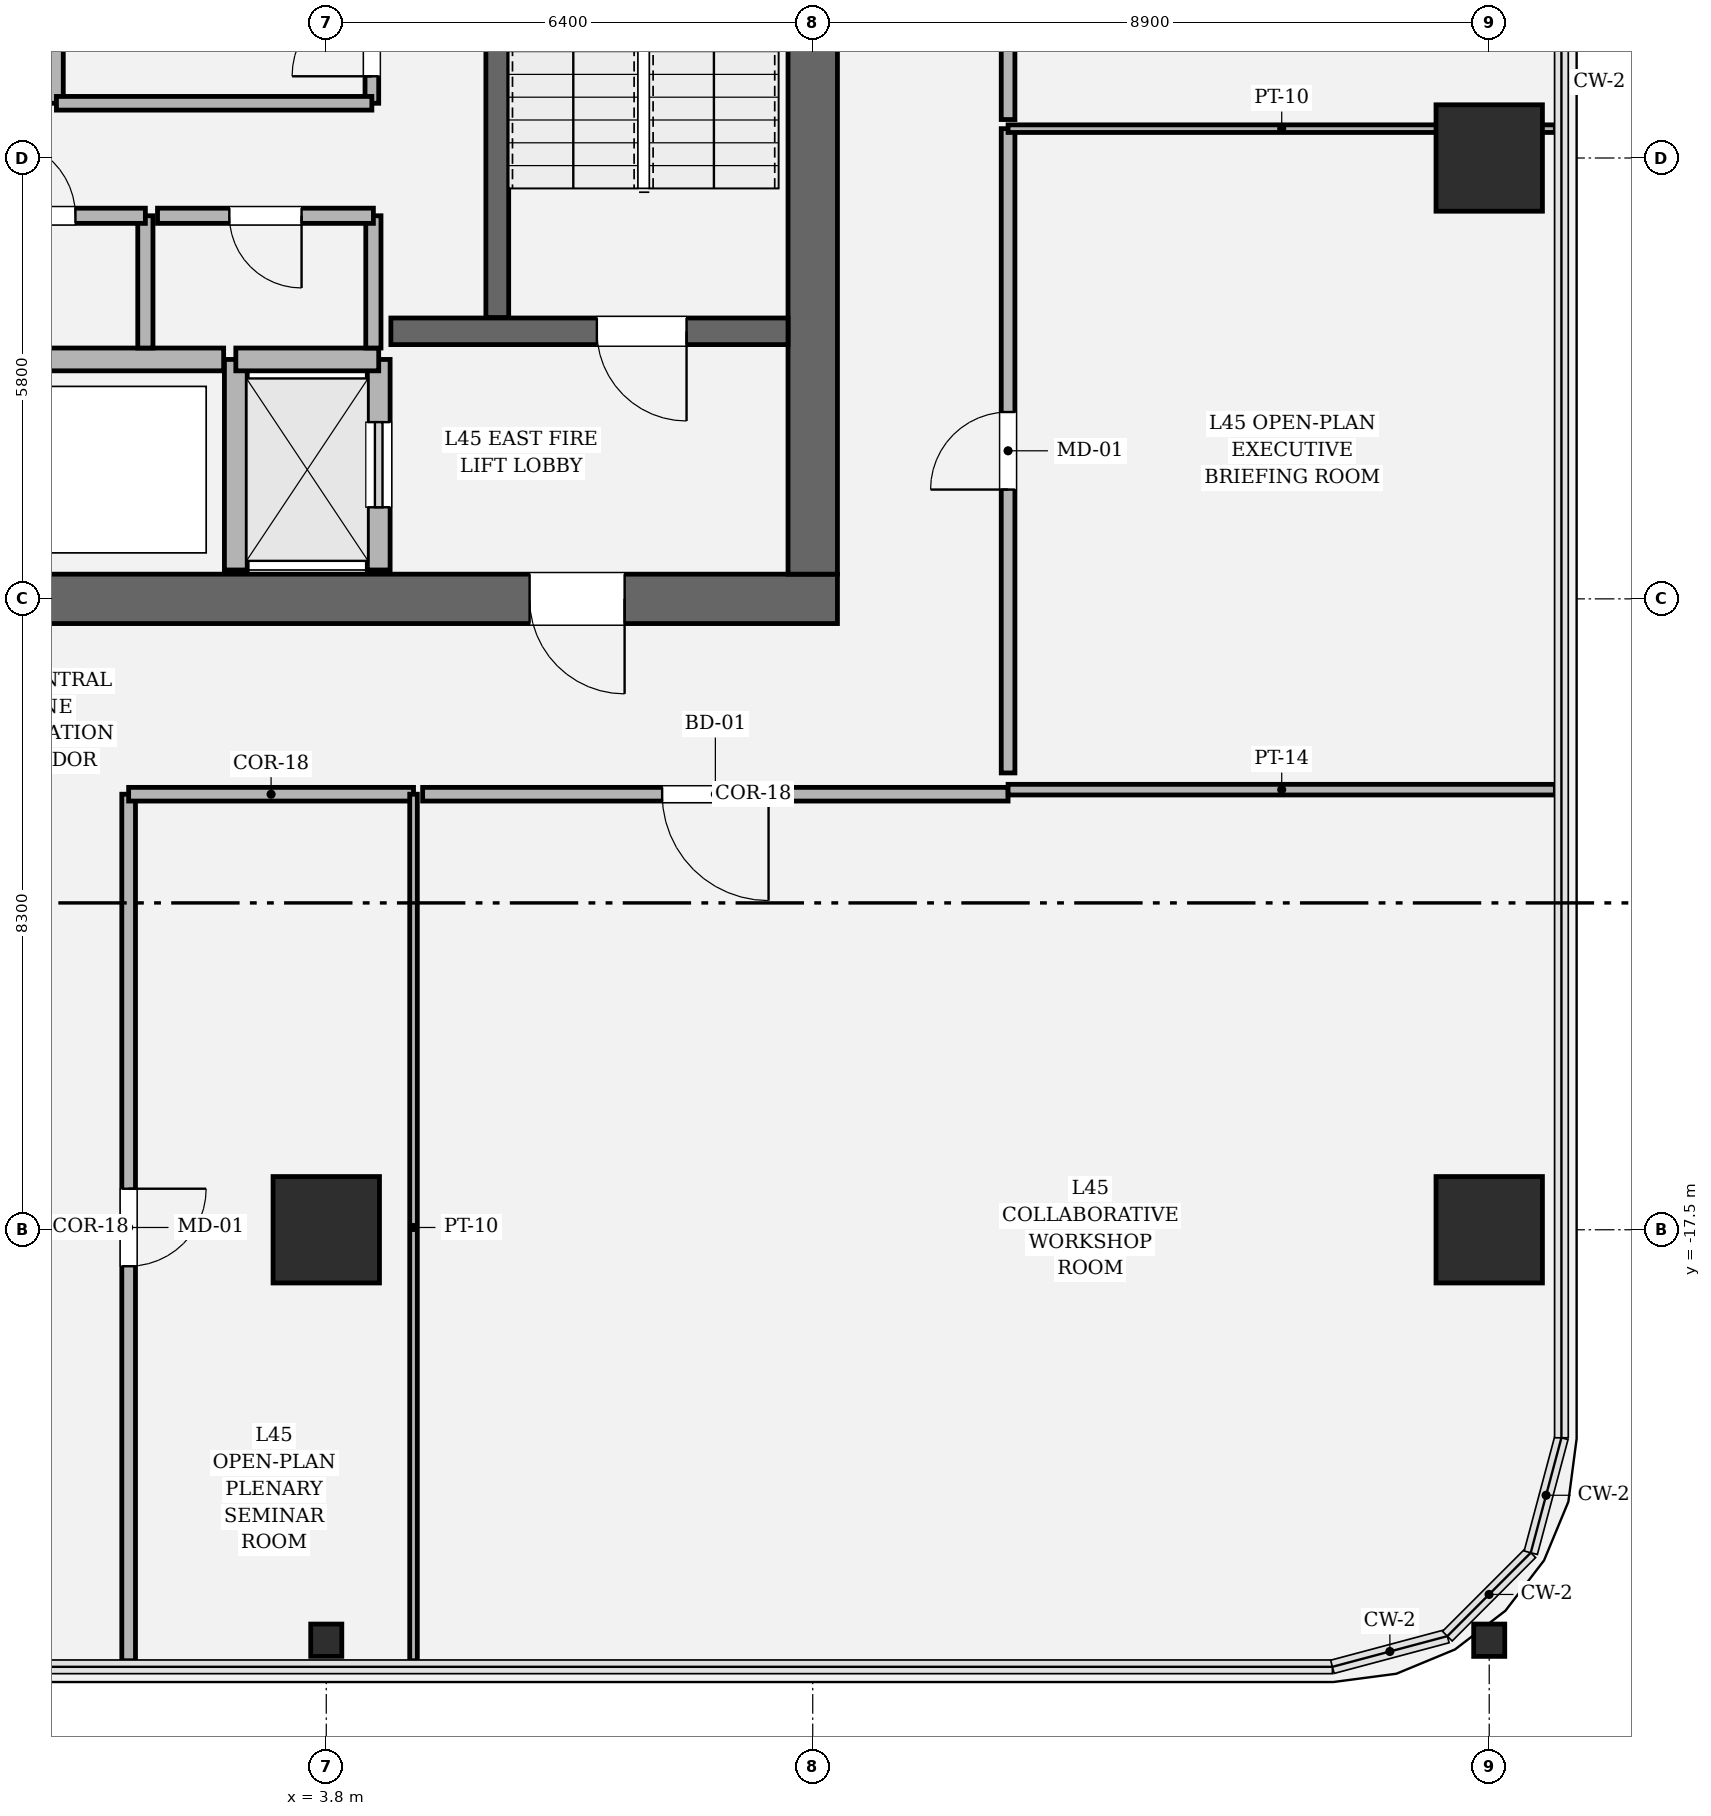
"""IFC4 building model, lengths in metres.
Left out: names, types, materials, properties, quantities, classifications, styles, units other than length and angle.
Written with IfcOpenShell. Run it as: python <this file> out.ifc"""

import sys

from ifc_helpers import new_model, si_unit, direction, frame, frame_2d, origin, origin_2d, place, context, subcontext, project, spatial, rectangle, hollow_rectangle, i_section, extrude, element, fill, save


model = new_model("IFC4")
c1 = context("Model", 3, precision=1e-05, world=origin(), true_north=direction((0.0, 1.0)))
c2 = subcontext(c1, "Body", "Model", "MODEL_VIEW")
j1 = project(units=[si_unit("LENGTHUNIT", "METRE"), si_unit("PLANEANGLEUNIT", "RADIAN")], contexts=[c1])
p1 = place(None, origin())
s1 = spatial("IfcSite", under=j1, at=p1, CompositionType="ELEMENT")
p2 = place(p1, origin())
s2 = spatial("IfcBuilding", under=s1, at=p2, CompositionType="ELEMENT")
p3 = place(p2, frame((0.0, 0.0, 192.45)))
s3 = spatial("IfcBuildingStorey", under=s2, at=p3, CompositionType="ELEMENT", Elevation=192.45)
p4 = place(p3, frame((10.525, -9.2, 0.0), z_axis=(0.0, 0.0, 1.0), x_axis=(-1.0, 0.0, 0.0)))
e1 = element("IfcWall", 1, at=p4, inside=s3, PredefinedType="SHEAR", context=c2, shape_type="SweptSolid", body=[
    extrude(rectangle(XDim=21.05, YDim=0.65, at=frame_2d((10.525, 0.0))), origin(), (0.0, 0.0, 1.0), 4.05),
])
p5 = place(p4, frame((2.8, 0.0, 0.0)))
e2 = element("IfcOpeningElement", 2, at=p5, cuts=e1, PredefinedType="OPENING", context=c2, shape_type="SweptSolid", body=[
    extrude(rectangle(XDim=1.25, YDim=2.25, at=frame_2d((0.625, 1.125))), frame((0.0, 0.335, 0.0), z_axis=(0.0, -1.0, 0.0), x_axis=(1.0, 0.0, 0.0)), (0.0, 0.0, 1.0), 0.67),
])
p6 = place(p4, frame((17.0, 0.0, 0.0)))
e3 = element("IfcOpeningElement", 3, at=p6, cuts=e1, PredefinedType="OPENING", context=c2, shape_type="SweptSolid", body=[
    extrude(rectangle(XDim=1.25, YDim=2.25, at=frame_2d((0.625, 1.125))), frame((0.0, 0.335, 0.0), z_axis=(0.0, -1.0, 0.0), x_axis=(1.0, 0.0, 0.0)), (0.0, 0.0, 1.0), 0.67),
])
p7 = place(p3, frame((10.2, 8.875, 0.0), z_axis=(0.0, 0.0, 1.0), x_axis=(0.0, -1.0, 0.0)))
e4 = element("IfcWall", 4, at=p7, inside=s3, PredefinedType="SHEAR", context=c2, shape_type="SweptSolid", body=[
    extrude(rectangle(XDim=17.75, YDim=0.65, at=frame_2d((8.875, 0.0))), origin(), (0.0, 0.0, 1.0), 4.05),
])
p8 = place(p7, frame((3.905, 0.0, 0.0)))
e5 = element("IfcOpeningElement", 5, at=p8, cuts=e4, PredefinedType="OPENING", context=c2, shape_type="SweptSolid", body=[
    extrude(rectangle(XDim=1.18, YDim=2.2, at=frame_2d((0.59, 1.1))), frame((0.0, 0.335, 0.0), z_axis=(0.0, -1.0, 0.0), x_axis=(1.0, 0.0, 0.0)), (0.0, 0.0, 1.0), 0.67),
])
p9 = place(p3, frame((6.05, 3.45, 0.0), z_axis=(0.0, 0.0, 1.0), x_axis=(0.0, -1.0, 0.0)))
e6 = element("IfcWall", 6, at=p9, inside=s3, PredefinedType="SOLIDWALL", context=c2, shape_type="SweptSolid", body=[
    extrude(rectangle(XDim=8.95, YDim=0.3, at=frame_2d((4.475, 0.0))), origin(), (0.0, 0.0, 1.0), 4.05),
])
p10 = place(p3, frame((4.65, -5.68, 0.0), z_axis=(0.0, 0.0, 1.0), x_axis=(1.0, 0.0, 0.0)))
e7 = element("IfcWall", 7, at=p10, inside=s3, PredefinedType="SOLIDWALL", context=c2, shape_type="SweptSolid", body=[
    extrude(rectangle(XDim=5.225, YDim=0.35, at=frame_2d((2.613, 0.0))), origin(), (0.0, 0.0, 1.0), 4.05),
])
p11 = place(p10, frame((2.71, 0.0, 0.0)))
e8 = element("IfcOpeningElement", 8, at=p11, cuts=e7, PredefinedType="OPENING", context=c2, shape_type="SweptSolid", body=[
    extrude(rectangle(XDim=1.18, YDim=2.2, at=frame_2d((0.59, 1.1))), frame((0.0, 0.185, 0.0), z_axis=(0.0, -1.0, 0.0), x_axis=(1.0, 0.0, 0.0)), (0.0, 0.0, 1.0), 0.37),
])
for number, where, z_axis, x_axis in (
    (9, (3.8, -17.5, 0.0), (0.0, 0.0, 1.0), (1.0, 0.0, 0.0)),
    (10, (19.1, -17.5, 0.0), (0.0, 0.0, 1.0), (1.0, 0.0, 0.0)),
    (11, (19.1, -3.4, 0.0), (0.0, 0.0, 1.0), (1.0, 0.0, 0.0)),
):
    element("IfcColumn", number, at=place(p3, frame(where, z_axis=z_axis, x_axis=x_axis)), inside=s3, PredefinedType="COLUMN", context=c2, shape_type="SweptSolid", body=[
        extrude(hollow_rectangle(XDim=1.4, YDim=1.4, WallThickness=0.042, at=origin_2d()), origin(), (0.0, 0.0, 1.0), 4.05),
    ])
for number, where, z_axis, x_axis in (
    (12, (3.8, -22.9, 0.0), (0.0, 0.0, 1.0), (1.0, 0.0, 0.0)),
    (13, (19.1, -22.9, 0.0), (0.0, 0.0, 1.0), (1.0, 0.0, 0.0)),
):
    element("IfcColumn", number, at=place(p3, frame(where, z_axis=z_axis, x_axis=x_axis)), inside=s3, PredefinedType="COLUMN", context=c2, shape_type="SweptSolid", body=[
        extrude(i_section(OverallWidth=0.409, OverallDepth=0.425, WebThickness=0.032, FlangeThickness=0.052, FilletRadius=0.018, at=origin_2d()), origin(), (0.0, 0.0, 1.0), 4.048),
    ])
p12 = place(p3, frame((4.49, -8.82, 0.0), z_axis=(0.0, 0.0, 1.0), x_axis=(0.0, 1.0, 0.0)))
e14 = element("IfcWall", 14, at=p12, inside=s3, PredefinedType="SOLIDWALL", context=c2, shape_type="SweptSolid", body=[
    extrude(rectangle(XDim=2.77, YDim=0.3, at=frame_2d((1.385, 0.0))), origin(), (0.0, 0.0, 1.0), 3.83),
])
p13 = place(p12, frame((0.825, 0.0, 0.0)))
e15 = element("IfcOpeningElement", 15, at=p13, cuts=e14, PredefinedType="OPENING", context=c2, shape_type="SweptSolid", body=[
    extrude(rectangle(XDim=1.12, YDim=2.25, at=frame_2d((0.56, 1.125))), frame((0.0, 0.16, 0.0), z_axis=(0.0, -1.0, 0.0), x_axis=(1.0, 0.0, 0.0)), (0.0, 0.0, 1.0), 0.32),
])
p14 = place(p3, frame((2.61, -8.82, 0.0), z_axis=(0.0, 0.0, 1.0), x_axis=(0.0, 1.0, 0.0)))
e16 = element("IfcWall", 16, at=p14, inside=s3, PredefinedType="SOLIDWALL", context=c2, shape_type="SweptSolid", body=[
    extrude(rectangle(XDim=2.77, YDim=0.3, at=frame_2d((1.385, 0.0))), origin(), (0.0, 0.0, 1.0), 3.83),
])
p15 = place(p3, frame((2.61, -6.05, 0.0), z_axis=(0.0, 0.0, 1.0), x_axis=(1.0, 0.0, 0.0)))
e17 = element("IfcWall", 17, at=p15, inside=s3, PredefinedType="SOLIDWALL", context=c2, shape_type="SweptSolid", body=[
    extrude(rectangle(XDim=1.88, YDim=0.3, at=frame_2d((0.94, 0.0))), origin(), (0.0, 0.0, 1.0), 3.83),
])
p16 = place(p3, frame((-2.45, -6.05, 0.0), z_axis=(0.0, 0.0, 1.0), x_axis=(1.0, 0.0, 0.0)))
e18 = element("IfcWall", 18, at=p16, inside=s3, PredefinedType="SOLIDWALL", context=c2, shape_type="SweptSolid", body=[
    extrude(rectangle(XDim=4.9, YDim=0.3, at=frame_2d((2.45, 0.0))), origin(), (0.0, 0.0, 1.0), 3.83),
])
p17 = place(p3, frame((1.42, -5.9, 0.0), z_axis=(0.0, 0.0, 1.0), x_axis=(0.0, 1.0, 0.0)))
e19 = element("IfcWall", 19, at=p17, inside=s3, PredefinedType="SOLIDWALL", context=c2, shape_type="SweptSolid", body=[
    extrude(rectangle(XDim=1.74, YDim=0.2, at=frame_2d((0.87, 0.0))), origin(), (0.0, 0.0, 1.0), 3.83),
])
p18 = place(p3, frame((1.42, -4.16, 0.0), z_axis=(0.0, 0.0, 1.0), x_axis=(-1.0, 0.0, 0.0)))
e20 = element("IfcWall", 20, at=p18, inside=s3, PredefinedType="SOLIDWALL", context=c2, shape_type="SweptSolid", body=[
    extrude(rectangle(XDim=2.84, YDim=0.2, at=frame_2d((1.42, 0.0))), origin(), (0.0, 0.0, 1.0), 3.83),
])
p19 = place(p18, frame((0.92, 0.0, 0.0)))
e21 = element("IfcOpeningElement", 21, at=p19, cuts=e20, PredefinedType="OPENING", context=c2, shape_type="SweptSolid", body=[
    extrude(rectangle(XDim=1.0, YDim=2.15, at=frame_2d((0.5, 1.075))), frame((0.0, 0.11, 0.0), z_axis=(0.0, -1.0, 0.0), x_axis=(1.0, 0.0, 0.0)), (0.0, 0.0, 1.0), 0.22),
])
p20 = place(p3, frame((4.42, -5.9, 0.0), z_axis=(0.0, 0.0, 1.0), x_axis=(0.0, 1.0, 0.0)))
e22 = element("IfcWall", 22, at=p20, inside=s3, PredefinedType="SOLIDWALL", context=c2, shape_type="SweptSolid", body=[
    extrude(rectangle(XDim=1.74, YDim=0.2, at=frame_2d((0.87, 0.0))), origin(), (0.0, 0.0, 1.0), 3.83),
])
p21 = place(p3, frame((4.42, -4.16, 0.0), z_axis=(0.0, 0.0, 1.0), x_axis=(-1.0, 0.0, 0.0)))
e23 = element("IfcWall", 23, at=p21, inside=s3, PredefinedType="SOLIDWALL", context=c2, shape_type="SweptSolid", body=[
    extrude(rectangle(XDim=2.84, YDim=0.2, at=frame_2d((1.42, 0.0))), origin(), (0.0, 0.0, 1.0), 3.83),
])
p22 = place(p21, frame((0.945, 0.0, 0.0)))
e24 = element("IfcOpeningElement", 24, at=p22, cuts=e23, PredefinedType="OPENING", context=c2, shape_type="SweptSolid", body=[
    extrude(rectangle(XDim=0.95, YDim=2.15, at=frame_2d((0.475, 1.075))), frame((0.0, 0.11, 0.0), z_axis=(0.0, -1.0, 0.0), x_axis=(1.0, 0.0, 0.0)), (0.0, 0.0, 1.0), 0.22),
])
p23 = place(p3, frame((4.4, -2.68, 0.0), z_axis=(0.0, 0.0, 1.0), x_axis=(0.0, 1.0, 0.0)))
e25 = element("IfcWall", 25, at=p23, inside=s3, PredefinedType="PARTITIONING", context=c2, shape_type="SweptSolid", body=[
    extrude(rectangle(XDim=1.76, YDim=0.18, at=frame_2d((0.88, 0.0))), origin(), (0.0, 0.0, 1.0), 3.83),
])
p24 = place(p23, frame((0.355, 0.0, 0.0)))
e26 = element("IfcOpeningElement", 26, at=p24, cuts=e25, PredefinedType="OPENING", context=c2, shape_type="SweptSolid", body=[
    extrude(rectangle(XDim=1.05, YDim=2.2, at=frame_2d((0.525, 1.1))), frame((0.0, 0.1, 0.0), z_axis=(0.0, -1.0, 0.0), x_axis=(1.0, 0.0, 0.0)), (0.0, 0.0, 1.0), 0.2),
])
p25 = place(p3, frame((0.25, -0.92, 0.0), z_axis=(0.0, 0.0, 1.0), x_axis=(0.0, -1.0, 0.0)))
e27 = element("IfcWall", 27, at=p25, inside=s3, PredefinedType="PARTITIONING", context=c2, shape_type="SweptSolid", body=[
    extrude(rectangle(XDim=1.76, YDim=0.18, at=frame_2d((0.88, 0.0))), origin(), (0.0, 0.0, 1.0), 3.83),
])
p26 = place(p3, frame((0.25, -2.68, 0.0), z_axis=(0.0, 0.0, 1.0), x_axis=(1.0, 0.0, 0.0)))
e28 = element("IfcWall", 28, at=p26, inside=s3, PredefinedType="PARTITIONING", context=c2, shape_type="SweptSolid", body=[
    extrude(rectangle(XDim=4.15, YDim=0.18, at=frame_2d((2.075, 0.0))), origin(), (0.0, 0.0, 1.0), 3.83),
])
p27 = place(p3, frame((1.2, -23.17, 0.0), z_axis=(0.0, 0.0, 1.0), x_axis=(0.0, 1.0, 0.0)))
e29 = element("IfcWall", 29, at=p27, inside=s3, PredefinedType="PARTITIONING", context=c2, shape_type="SweptSolid", body=[
    extrude(rectangle(XDim=11.4, YDim=0.18, at=frame_2d((5.7, 0.0))), origin(), (0.0, 0.0, 1.0), 2.544),
])
p28 = place(p27, frame((5.19, 0.0, 0.0)))
e30 = element("IfcOpeningElement", 30, at=p28, cuts=e29, PredefinedType="OPENING", context=c2, shape_type="SweptSolid", body=[
    extrude(rectangle(XDim=1.02, YDim=2.2, at=frame_2d((0.51, 1.1))), frame((0.0, 0.1, 0.0), z_axis=(0.0, -1.0, 0.0), x_axis=(1.0, 0.0, 0.0)), (0.0, 0.0, 1.0), 0.2),
])
p29 = place(p3, frame((1.2, -11.77, 0.0), z_axis=(0.0, 0.0, 1.0), x_axis=(1.0, 0.0, 0.0)))
e31 = element("IfcWall", 31, at=p29, inside=s3, PredefinedType="PARTITIONING", context=c2, shape_type="SweptSolid", body=[
    extrude(rectangle(XDim=3.748, YDim=0.18, at=frame_2d((1.874, 0.0))), origin(), (0.0, 0.0, 1.0), 3.174),
])
p30 = place(p3, frame((4.948, -11.77, 0.0), z_axis=(0.0, 0.0, 1.0), x_axis=(0.0, -1.0, 0.0)))
e32 = element("IfcWall", 32, at=p30, inside=s3, PredefinedType="PARTITIONING", context=c2, shape_type="SweptSolid", body=[
    extrude(rectangle(XDim=11.4, YDim=0.1, at=frame_2d((5.7, 0.0))), origin(), (0.0, 0.0, 1.0), 2.544),
])
p31 = place(p3, frame((5.068, -11.77, 0.0), z_axis=(0.0, 0.0, 1.0), x_axis=(1.0, 0.0, 0.0)))
e33 = element("IfcWall", 33, at=p31, inside=s3, PredefinedType="PARTITIONING", context=c2, shape_type="SweptSolid", body=[
    extrude(rectangle(XDim=7.702, YDim=0.18, at=frame_2d((3.851, 0.0))), origin(), (0.0, 0.0, 1.0), 3.174),
])
p32 = place(p31, frame((3.151, 0.0, 0.0)))
e34 = element("IfcOpeningElement", 34, at=p32, cuts=e33, PredefinedType="OPENING", context=c2, shape_type="SweptSolid", body=[
    extrude(rectangle(XDim=1.4, YDim=2.25, at=frame_2d((0.7, 1.125))), frame((0.0, 0.1, 0.0), z_axis=(0.0, -1.0, 0.0), x_axis=(1.0, 0.0, 0.0)), (0.0, 0.0, 1.0), 0.2),
])
p33 = place(p3, frame((12.77, -11.71, 0.0), z_axis=(0.0, 0.0, 1.0), x_axis=(1.0, 0.0, 0.0)))
e35 = element("IfcWall", 35, at=p33, inside=s3, PredefinedType="PARTITIONING", context=c2, shape_type="SweptSolid", body=[
    extrude(rectangle(XDim=7.2, YDim=0.14, at=frame_2d((3.6, 0.0))), origin(), (0.0, 0.0, 1.0), 3.174),
])
p34 = place(p3, frame((12.77, -11.49, 0.0), z_axis=(0.0, 0.0, 1.0), x_axis=(0.0, 1.0, 0.0)))
e36 = element("IfcWall", 36, at=p34, inside=s3, PredefinedType="PARTITIONING", context=c2, shape_type="SweptSolid", body=[
    extrude(rectangle(XDim=8.476, YDim=0.18, at=frame_2d((4.238, 0.0))), origin(), (0.0, 0.0, 1.0), 3.174),
])
p35 = place(p34, frame((3.728, 0.0, 0.0)))
e37 = element("IfcOpeningElement", 37, at=p35, cuts=e36, PredefinedType="OPENING", context=c2, shape_type="SweptSolid", body=[
    extrude(rectangle(XDim=1.02, YDim=2.2, at=frame_2d((0.51, 1.1))), frame((0.0, 0.1, 0.0), z_axis=(0.0, -1.0, 0.0), x_axis=(1.0, 0.0, 0.0)), (0.0, 0.0, 1.0), 0.2),
])
p36 = place(p3, frame((12.77, -3.014, 0.0), z_axis=(0.0, 0.0, 1.0), x_axis=(1.0, 0.0, 0.0)))
e38 = element("IfcWall", 38, at=p36, inside=s3, PredefinedType="PARTITIONING", context=c2, shape_type="SweptSolid", body=[
    extrude(rectangle(XDim=7.2, YDim=0.1, at=frame_2d((3.6, 0.0))), origin(), (0.0, 0.0, 1.0), 3.174),
])
p37 = place(p3, frame((12.77, -2.894, 0.0), z_axis=(0.0, 0.0, 1.0), x_axis=(0.0, 1.0, 0.0)))
e39 = element("IfcWall", 39, at=p37, inside=s3, PredefinedType="PARTITIONING", context=c2, shape_type="SweptSolid", body=[
    extrude(rectangle(XDim=6.634, YDim=0.18, at=frame_2d((3.317, 0.0))), origin(), (0.0, 0.0, 1.0), 3.174),
])
p38 = place(p37, frame((2.792, 0.0, 0.0)))
e40 = element("IfcOpeningElement", 40, at=p38, cuts=e39, PredefinedType="OPENING", context=c2, shape_type="SweptSolid", body=[
    extrude(rectangle(XDim=1.05, YDim=2.2, at=frame_2d((0.525, 1.1))), frame((0.0, 0.1, 0.0), z_axis=(0.0, -1.0, 0.0), x_axis=(1.0, 0.0, 0.0)), (0.0, 0.0, 1.0), 0.2),
])
p39 = place(p11, origin())
e41 = element("IfcDoor", 41, at=p39, inside=s3, OperationType="SINGLE_SWING_RIGHT", PredefinedType="DOOR", context=c2, shape_type="SweptSolid", body=[
    extrude(rectangle(XDim=1.18, YDim=2.2, at=frame_2d((0.59, 1.1))), frame((0.0, 0.025, 0.0), z_axis=(0.0, -1.0, 0.0), x_axis=(1.0, 0.0, 0.0)), (0.0, 0.0, 1.0), 0.05),
])
fill(e8, e41)
p40 = place(p5, origin())
e42 = element("IfcDoor", 42, at=p40, inside=s3, OperationType="SINGLE_SWING_LEFT", PredefinedType="DOOR", context=c2, shape_type="SweptSolid", body=[
    extrude(rectangle(XDim=1.25, YDim=2.25, at=frame_2d((0.625, 1.125))), frame((0.0, 0.025, 0.0), z_axis=(0.0, -1.0, 0.0), x_axis=(1.0, 0.0, 0.0)), (0.0, 0.0, 1.0), 0.05),
])
fill(e2, e42)
p41 = place(p13, origin())
e43 = element("IfcDoor", 43, at=p41, inside=s3, OperationType="SLIDING_TO_RIGHT", PredefinedType="DOOR", context=c2, shape_type="SweptSolid", body=[
    extrude(rectangle(XDim=1.12, YDim=2.25, at=frame_2d((0.56, 1.125))), frame((0.0, 0.025, 0.0), z_axis=(0.0, -1.0, 0.0), x_axis=(1.0, 0.0, 0.0)), (0.0, 0.0, 1.0), 0.05),
])
fill(e15, e43)
p42 = place(p19, origin())
e44 = element("IfcDoor", 44, at=p42, inside=s3, OperationType="SINGLE_SWING_RIGHT", PredefinedType="DOOR", context=c2, shape_type="SweptSolid", body=[
    extrude(rectangle(XDim=1.0, YDim=2.15, at=frame_2d((0.5, 1.075))), frame((0.0, 0.025, 0.0), z_axis=(0.0, -1.0, 0.0), x_axis=(1.0, 0.0, 0.0)), (0.0, 0.0, 1.0), 0.05),
])
fill(e21, e44)
p43 = place(p22, origin())
e45 = element("IfcDoor", 45, at=p43, inside=s3, OperationType="SINGLE_SWING_LEFT", PredefinedType="DOOR", context=c2, shape_type="SweptSolid", body=[
    extrude(rectangle(XDim=0.95, YDim=2.15, at=frame_2d((0.475, 1.075))), frame((0.0, 0.025, 0.0), z_axis=(0.0, -1.0, 0.0), x_axis=(1.0, 0.0, 0.0)), (0.0, 0.0, 1.0), 0.05),
])
fill(e24, e45)
p44 = place(p24, origin())
e46 = element("IfcDoor", 46, at=p44, inside=s3, OperationType="SINGLE_SWING_LEFT", PredefinedType="DOOR", context=c2, shape_type="SweptSolid", body=[
    extrude(rectangle(XDim=1.05, YDim=2.2, at=frame_2d((0.525, 1.1))), frame((0.0, 0.025, 0.0), z_axis=(0.0, -1.0, 0.0), x_axis=(1.0, 0.0, 0.0)), (0.0, 0.0, 1.0), 0.05),
])
fill(e26, e46)
p45 = place(p28, origin())
e47 = element("IfcDoor", 47, at=p45, inside=s3, OperationType="SINGLE_SWING_RIGHT", PredefinedType="DOOR", context=c2, shape_type="SweptSolid", body=[
    extrude(rectangle(XDim=1.02, YDim=2.2, at=frame_2d((0.51, 1.1))), frame((0.0, 0.025, 0.0), z_axis=(0.0, -1.0, 0.0), x_axis=(1.0, 0.0, 0.0)), (0.0, 0.0, 1.0), 0.05),
])
fill(e30, e47)
p46 = place(p32, origin())
e48 = element("IfcDoor", 48, at=p46, inside=s3, OperationType="SINGLE_SWING_RIGHT", PredefinedType="DOOR", context=c2, shape_type="SweptSolid", body=[
    extrude(rectangle(XDim=1.4, YDim=2.25, at=frame_2d((0.7, 1.125))), frame((0.0, 0.025, 0.0), z_axis=(0.0, -1.0, 0.0), x_axis=(1.0, 0.0, 0.0)), (0.0, 0.0, 1.0), 0.05),
])
fill(e34, e48)
p47 = place(p35, origin())
e49 = element("IfcDoor", 49, at=p47, inside=s3, OperationType="SINGLE_SWING_LEFT", PredefinedType="DOOR", context=c2, shape_type="SweptSolid", body=[
    extrude(rectangle(XDim=1.02, YDim=2.2, at=frame_2d((0.51, 1.1))), frame((0.0, 0.025, 0.0), z_axis=(0.0, -1.0, 0.0), x_axis=(1.0, 0.0, 0.0)), (0.0, 0.0, 1.0), 0.05),
])
fill(e37, e49)
save(model, sys.argv[1])
